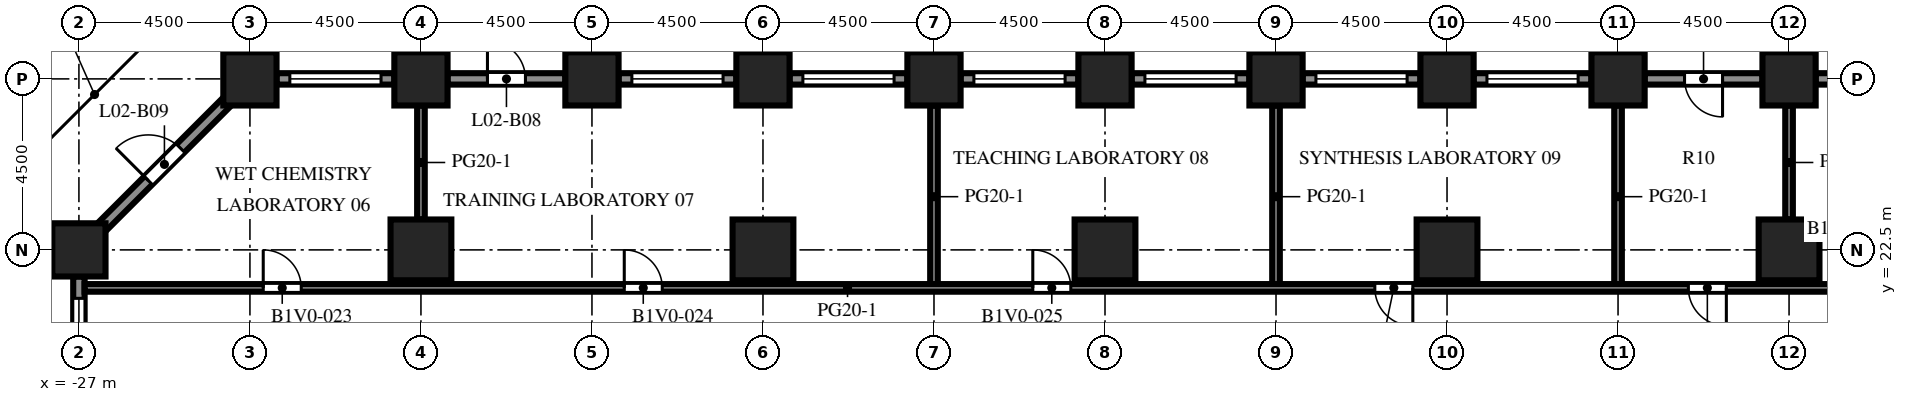
"""IFC4 building model, lengths in metres.
Left out: names, types, materials, properties, quantities, classifications, styles, units other than length and angle.
Written with IfcOpenShell. Run it as: python <this file> out.ifc"""

import sys

from ifc_helpers import new_model, si_unit, direction, frame, frame_2d, origin, origin_2d, place, context, subcontext, project, spatial, rectangle, extrude, element, fill, save


model = new_model("IFC4")
c1 = context("Model", 3, precision=1e-05, world=origin(), true_north=direction((0.0, 1.0)))
c2 = subcontext(c1, "Body", "Model", "MODEL_VIEW")
j1 = project(units=[si_unit("LENGTHUNIT", "METRE"), si_unit("PLANEANGLEUNIT", "RADIAN")], contexts=[c1])
p1 = place(None, origin())
s1 = spatial("IfcSite", under=j1, at=p1, CompositionType="ELEMENT")
p2 = place(p1, origin())
s2 = spatial("IfcBuilding", under=s1, at=p2, CompositionType="ELEMENT")
p3 = place(p2, frame((0.0, 0.0, 11.3)))
s3 = spatial("IfcBuildingStorey", under=s2, at=p3, CompositionType="ELEMENT", Elevation=11.3)
for number, where, z_axis, x_axis in (
    (1, (-27.0, 22.5, 0.0), (0.0, 0.0, 1.0), (1.0, 0.0, 0.0)),
    (2, (-22.5, 27.0, 0.0), (0.0, 0.0, 1.0), (1.0, 0.0, 0.0)),
    (3, (-18.0, 27.0, 0.0), (0.0, 0.0, 1.0), (1.0, 0.0, 0.0)),
    (4, (-13.5, 27.0, 0.0), (0.0, 0.0, 1.0), (1.0, 0.0, 0.0)),
    (5, (-9.0, 27.0, 0.0), (0.0, 0.0, 1.0), (1.0, 0.0, 0.0)),
    (6, (-4.5, 27.0, 0.0), (0.0, 0.0, 1.0), (1.0, 0.0, 0.0)),
    (7, (0.0, 27.0, 0.0), (0.0, 0.0, 1.0), (1.0, 0.0, 0.0)),
    (8, (4.5, 27.0, 0.0), (0.0, 0.0, 1.0), (1.0, 0.0, 0.0)),
    (9, (9.0, 27.0, 0.0), (0.0, 0.0, 1.0), (1.0, 0.0, 0.0)),
    (10, (13.5, 27.0, 0.0), (0.0, 0.0, 1.0), (1.0, 0.0, 0.0)),
    (11, (18.0, 27.0, 0.0), (0.0, 0.0, 1.0), (1.0, 0.0, 0.0)),
):
    element("IfcColumn", number, at=place(p3, frame(where, z_axis=z_axis, x_axis=x_axis)), inside=s3, PredefinedType="COLUMN", context=c2, shape_type="SweptSolid", body=[
        extrude(rectangle(XDim=1.4, YDim=1.4, at=origin_2d()), origin(), (0.0, 0.0, 1.0), 4.1),
    ])
for number, where, z_axis, x_axis in (
    (12, (-18.0, 22.5, 0.0), (0.0, 0.0, 1.0), (1.0, 0.0, 0.0)),
    (13, (-9.0, 22.5, 0.0), (0.0, 0.0, 1.0), (1.0, 0.0, 0.0)),
    (14, (0.0, 22.5, 0.0), (0.0, 0.0, 1.0), (1.0, 0.0, 0.0)),
    (15, (9.0, 22.5, 0.0), (0.0, 0.0, 1.0), (1.0, 0.0, 0.0)),
    (16, (18.0, 22.5, 0.0), (0.0, 0.0, 1.0), (1.0, 0.0, 0.0)),
):
    element("IfcColumn", number, at=place(p3, frame(where, z_axis=z_axis, x_axis=x_axis)), inside=s3, PredefinedType="COLUMN", context=c2, shape_type="SweptSolid", body=[
        extrude(rectangle(XDim=1.6, YDim=1.6, at=origin_2d()), origin(), (0.0, 0.0, 1.0), 4.1),
    ])
p4 = place(p3, frame((18.7, 27.0, 0.0), z_axis=(0.0, 0.0, 1.0), x_axis=(1.0, 0.0, 0.0)))
e17 = element("IfcWall", 17, at=p4, inside=s3, PredefinedType="SOLIDWALL", context=c2, shape_type="SweptSolid", body=[
    extrude(rectangle(XDim=3.1, YDim=0.3, at=frame_2d((1.55, 0.0))), origin(), (0.0, 0.0, 1.0), 2.75),
])
p5 = place(p4, frame((0.35, 0.0, 0.8)))
e18 = element("IfcOpeningElement", 18, at=p5, cuts=e17, PredefinedType="OPENING", context=c2, shape_type="SweptSolid", body=[
    extrude(rectangle(XDim=2.4, YDim=1.7, at=frame_2d((1.2, 0.85))), frame((0.0, 0.16, 0.0), z_axis=(0.0, -1.0, 0.0), x_axis=(1.0, 0.0, 0.0)), (0.0, 0.0, 1.0), 0.32),
])
p6 = place(p3, frame((14.2, 27.0, 0.0), z_axis=(0.0, 0.0, 1.0), x_axis=(1.0, 0.0, 0.0)))
e19 = element("IfcWall", 19, at=p6, inside=s3, PredefinedType="SOLIDWALL", context=c2, shape_type="SweptSolid", body=[
    extrude(rectangle(XDim=3.1, YDim=0.3, at=frame_2d((1.55, 0.0))), origin(), (0.0, 0.0, 1.0), 2.75),
])
p7 = place(p6, frame((1.05, 0.0, 0.0)))
e20 = element("IfcOpeningElement", 20, at=p7, cuts=e19, PredefinedType="OPENING", context=c2, shape_type="SweptSolid", body=[
    extrude(rectangle(XDim=1.0, YDim=2.2, at=frame_2d((0.5, 1.1))), frame((0.0, 0.16, 0.0), z_axis=(0.0, -1.0, 0.0), x_axis=(1.0, 0.0, 0.0)), (0.0, 0.0, 1.0), 0.32),
])
p8 = place(p3, frame((9.7, 27.0, 0.0), z_axis=(0.0, 0.0, 1.0), x_axis=(1.0, 0.0, 0.0)))
e21 = element("IfcWall", 21, at=p8, inside=s3, PredefinedType="SOLIDWALL", context=c2, shape_type="SweptSolid", body=[
    extrude(rectangle(XDim=3.1, YDim=0.3, at=frame_2d((1.55, 0.0))), origin(), (0.0, 0.0, 1.0), 2.75),
])
p9 = place(p8, frame((0.35, 0.0, 0.8)))
e22 = element("IfcOpeningElement", 22, at=p9, cuts=e21, PredefinedType="OPENING", context=c2, shape_type="SweptSolid", body=[
    extrude(rectangle(XDim=2.4, YDim=1.7, at=frame_2d((1.2, 0.85))), frame((0.0, 0.16, 0.0), z_axis=(0.0, -1.0, 0.0), x_axis=(1.0, 0.0, 0.0)), (0.0, 0.0, 1.0), 0.32),
])
p10 = place(p3, frame((5.2, 27.0, 0.0), z_axis=(0.0, 0.0, 1.0), x_axis=(1.0, 0.0, 0.0)))
e23 = element("IfcWall", 23, at=p10, inside=s3, PredefinedType="SOLIDWALL", context=c2, shape_type="SweptSolid", body=[
    extrude(rectangle(XDim=3.1, YDim=0.3, at=frame_2d((1.55, 0.0))), origin(), (0.0, 0.0, 1.0), 2.75),
])
p11 = place(p10, frame((0.35, 0.0, 0.8)))
e24 = element("IfcOpeningElement", 24, at=p11, cuts=e23, PredefinedType="OPENING", context=c2, shape_type="SweptSolid", body=[
    extrude(rectangle(XDim=2.4, YDim=1.7, at=frame_2d((1.2, 0.85))), frame((0.0, 0.16, 0.0), z_axis=(0.0, -1.0, 0.0), x_axis=(1.0, 0.0, 0.0)), (0.0, 0.0, 1.0), 0.32),
])
p12 = place(p3, frame((0.7, 27.0, 0.0), z_axis=(0.0, 0.0, 1.0), x_axis=(1.0, 0.0, 0.0)))
e25 = element("IfcWall", 25, at=p12, inside=s3, PredefinedType="SOLIDWALL", context=c2, shape_type="SweptSolid", body=[
    extrude(rectangle(XDim=3.1, YDim=0.3, at=frame_2d((1.55, 0.0))), origin(), (0.0, 0.0, 1.0), 2.75),
])
p13 = place(p12, frame((0.35, 0.0, 0.8)))
e26 = element("IfcOpeningElement", 26, at=p13, cuts=e25, PredefinedType="OPENING", context=c2, shape_type="SweptSolid", body=[
    extrude(rectangle(XDim=2.4, YDim=1.7, at=frame_2d((1.2, 0.85))), frame((0.0, 0.16, 0.0), z_axis=(0.0, -1.0, 0.0), x_axis=(1.0, 0.0, 0.0)), (0.0, 0.0, 1.0), 0.32),
])
p14 = place(p3, frame((-3.8, 27.0, 0.0), z_axis=(0.0, 0.0, 1.0), x_axis=(1.0, 0.0, 0.0)))
e27 = element("IfcWall", 27, at=p14, inside=s3, PredefinedType="SOLIDWALL", context=c2, shape_type="SweptSolid", body=[
    extrude(rectangle(XDim=3.1, YDim=0.3, at=frame_2d((1.55, 0.0))), origin(), (0.0, 0.0, 1.0), 2.75),
])
p15 = place(p14, frame((0.35, 0.0, 0.8)))
e28 = element("IfcOpeningElement", 28, at=p15, cuts=e27, PredefinedType="OPENING", context=c2, shape_type="SweptSolid", body=[
    extrude(rectangle(XDim=2.4, YDim=1.7, at=frame_2d((1.2, 0.85))), frame((0.0, 0.16, 0.0), z_axis=(0.0, -1.0, 0.0), x_axis=(1.0, 0.0, 0.0)), (0.0, 0.0, 1.0), 0.32),
])
p16 = place(p3, frame((-8.3, 27.0, 0.0), z_axis=(0.0, 0.0, 1.0), x_axis=(1.0, 0.0, 0.0)))
e29 = element("IfcWall", 29, at=p16, inside=s3, PredefinedType="SOLIDWALL", context=c2, shape_type="SweptSolid", body=[
    extrude(rectangle(XDim=3.1, YDim=0.3, at=frame_2d((1.55, 0.0))), origin(), (0.0, 0.0, 1.0), 2.75),
])
p17 = place(p16, frame((0.35, 0.0, 0.8)))
e30 = element("IfcOpeningElement", 30, at=p17, cuts=e29, PredefinedType="OPENING", context=c2, shape_type="SweptSolid", body=[
    extrude(rectangle(XDim=2.4, YDim=1.7, at=frame_2d((1.2, 0.85))), frame((0.0, 0.16, 0.0), z_axis=(0.0, -1.0, 0.0), x_axis=(1.0, 0.0, 0.0)), (0.0, 0.0, 1.0), 0.32),
])
p18 = place(p3, frame((-12.8, 27.0, 0.0), z_axis=(0.0, 0.0, 1.0), x_axis=(1.0, 0.0, 0.0)))
e31 = element("IfcWall", 31, at=p18, inside=s3, PredefinedType="SOLIDWALL", context=c2, shape_type="SweptSolid", body=[
    extrude(rectangle(XDim=3.1, YDim=0.3, at=frame_2d((1.55, 0.0))), origin(), (0.0, 0.0, 1.0), 2.75),
])
p19 = place(p18, frame((0.35, 0.0, 0.8)))
e32 = element("IfcOpeningElement", 32, at=p19, cuts=e31, PredefinedType="OPENING", context=c2, shape_type="SweptSolid", body=[
    extrude(rectangle(XDim=2.4, YDim=1.7, at=frame_2d((1.2, 0.85))), frame((0.0, 0.16, 0.0), z_axis=(0.0, -1.0, 0.0), x_axis=(1.0, 0.0, 0.0)), (0.0, 0.0, 1.0), 0.32),
])
p20 = place(p3, frame((-17.3, 27.0, 0.0), z_axis=(0.0, 0.0, 1.0), x_axis=(1.0, 0.0, 0.0)))
e33 = element("IfcWall", 33, at=p20, inside=s3, PredefinedType="SOLIDWALL", context=c2, shape_type="SweptSolid", body=[
    extrude(rectangle(XDim=3.1, YDim=0.3, at=frame_2d((1.55, 0.0))), origin(), (0.0, 0.0, 1.0), 2.75),
])
p21 = place(p20, frame((1.05, 0.0, 0.0)))
e34 = element("IfcOpeningElement", 34, at=p21, cuts=e33, PredefinedType="OPENING", context=c2, shape_type="SweptSolid", body=[
    extrude(rectangle(XDim=1.0, YDim=2.2, at=frame_2d((0.5, 1.1))), frame((0.0, 0.16, 0.0), z_axis=(0.0, -1.0, 0.0), x_axis=(1.0, 0.0, 0.0)), (0.0, 0.0, 1.0), 0.32),
])
p22 = place(p3, frame((-21.8, 27.0, 0.0), z_axis=(0.0, 0.0, 1.0), x_axis=(1.0, 0.0, 0.0)))
e35 = element("IfcWall", 35, at=p22, inside=s3, PredefinedType="SOLIDWALL", context=c2, shape_type="SweptSolid", body=[
    extrude(rectangle(XDim=3.1, YDim=0.3, at=frame_2d((1.55, 0.0))), origin(), (0.0, 0.0, 1.0), 2.75),
])
p23 = place(p22, frame((0.35, 0.0, 0.8)))
e36 = element("IfcOpeningElement", 36, at=p23, cuts=e35, PredefinedType="OPENING", context=c2, shape_type="SweptSolid", body=[
    extrude(rectangle(XDim=2.4, YDim=1.7, at=frame_2d((1.2, 0.85))), frame((0.0, 0.16, 0.0), z_axis=(0.0, -1.0, 0.0), x_axis=(1.0, 0.0, 0.0)), (0.0, 0.0, 1.0), 0.32),
])
p24 = place(p3, frame((-26.406, 23.094, 0.0), z_axis=(0.0, 0.0, 1.0), x_axis=(0.707106781187, 0.707106781187, 0.0)))
e37 = element("IfcWall", 37, at=p24, inside=s3, PredefinedType="SOLIDWALL", context=c2, shape_type="SweptSolid", body=[
    extrude(rectangle(XDim=4.684, YDim=0.3, at=frame_2d((2.342, 0.0))), origin(), (0.0, 0.0, 1.0), 2.75),
])
p25 = place(p24, frame((1.742, 0.0, 0.0)))
e38 = element("IfcOpeningElement", 38, at=p25, cuts=e37, PredefinedType="OPENING", context=c2, shape_type="SweptSolid", body=[
    extrude(rectangle(XDim=1.2, YDim=2.2, at=frame_2d((0.6, 1.1))), frame((0.0, 0.16, 0.0), z_axis=(0.0, -1.0, 0.0), x_axis=(1.0, 0.0, 0.0)), (0.0, 0.0, 1.0), 0.32),
])
p26 = place(p3, frame((-27.0, 18.7, 0.0), z_axis=(0.0, 0.0, 1.0), x_axis=(0.0, 1.0, 0.0)))
e39 = element("IfcWall", 39, at=p26, inside=s3, PredefinedType="SOLIDWALL", context=c2, shape_type="SweptSolid", body=[
    extrude(rectangle(XDim=3.1, YDim=0.3, at=frame_2d((1.55, 0.0))), origin(), (0.0, 0.0, 1.0), 2.75),
])
p27 = place(p26, frame((0.125, 0.0, 0.8)))
e40 = element("IfcOpeningElement", 40, at=p27, cuts=e39, PredefinedType="OPENING", context=c2, shape_type="SweptSolid", body=[
    extrude(rectangle(XDim=2.4, YDim=1.7, at=frame_2d((1.2, 0.85))), frame((0.0, 0.16, 0.0), z_axis=(0.0, -1.0, 0.0), x_axis=(1.0, 0.0, 0.0)), (0.0, 0.0, 1.0), 0.32),
])
p28 = place(p3, frame((-18.0, 23.3, 0.0), z_axis=(0.0, 0.0, 1.0), x_axis=(0.0, 1.0, 0.0)))
e41 = element("IfcWall", 41, at=p28, inside=s3, PredefinedType="PARTITIONING", context=c2, shape_type="SweptSolid", body=[
    extrude(rectangle(XDim=3.0, YDim=0.2, at=frame_2d((1.5, 0.0))), origin(), (0.0, 0.0, 1.0), 3.65),
])
for number, where, z_axis, x_axis in (
    (42, (-4.5, 21.5, 0.0), (0.0, 0.0, 1.0), (0.0, 1.0, 0.0)),
    (43, (4.5, 21.5, 0.0), (0.0, 0.0, 1.0), (0.0, 1.0, 0.0)),
    (44, (13.5, 21.5, 0.0), (0.0, 0.0, 1.0), (0.0, 1.0, 0.0)),
):
    element("IfcWall", number, at=place(p3, frame(where, z_axis=z_axis, x_axis=x_axis)), inside=s3, PredefinedType="PARTITIONING", context=c2, shape_type="SweptSolid", body=[
        extrude(rectangle(XDim=4.8, YDim=0.2, at=frame_2d((2.4, 0.0))), origin(), (0.0, 0.0, 1.0), 3.65),
    ])
p29 = place(p3, frame((18.0, 23.3, 0.0), z_axis=(0.0, 0.0, 1.0), x_axis=(0.0, 1.0, 0.0)))
e45 = element("IfcWall", 45, at=p29, inside=s3, PredefinedType="PARTITIONING", context=c2, shape_type="SweptSolid", body=[
    extrude(rectangle(XDim=3.0, YDim=0.2, at=frame_2d((1.5, 0.0))), origin(), (0.0, 0.0, 1.0), 3.65),
])
p30 = place(p3, frame((-26.85, 21.5, 0.0), z_axis=(0.0, 0.0, 1.0), x_axis=(1.0, 0.0, 0.0)))
e46 = element("IfcWall", 46, at=p30, inside=s3, PredefinedType="PARTITIONING", context=c2, shape_type="SweptSolid", body=[
    extrude(rectangle(XDim=53.7, YDim=0.2, at=frame_2d((26.85, 0.0))), origin(), (0.0, 0.0, 1.0), 3.65),
])
p31 = place(p30, frame((4.7, 0.0, 0.0)))
e47 = element("IfcOpeningElement", 47, at=p31, cuts=e46, PredefinedType="OPENING", context=c2, shape_type="SweptSolid", body=[
    extrude(rectangle(XDim=1.0, YDim=2.1, at=frame_2d((0.5, 1.05))), frame((0.0, 0.11, 0.0), z_axis=(0.0, -1.0, 0.0), x_axis=(1.0, 0.0, 0.0)), (0.0, 0.0, 1.0), 0.22),
])
p32 = place(p30, frame((14.2, 0.0, 0.0)))
e48 = element("IfcOpeningElement", 48, at=p32, cuts=e46, PredefinedType="OPENING", context=c2, shape_type="SweptSolid", body=[
    extrude(rectangle(XDim=1.0, YDim=2.1, at=frame_2d((0.5, 1.05))), frame((0.0, 0.11, 0.0), z_axis=(0.0, -1.0, 0.0), x_axis=(1.0, 0.0, 0.0)), (0.0, 0.0, 1.0), 0.22),
])
p33 = place(p30, frame((24.95, 0.0, 0.0)))
e49 = element("IfcOpeningElement", 49, at=p33, cuts=e46, PredefinedType="OPENING", context=c2, shape_type="SweptSolid", body=[
    extrude(rectangle(XDim=1.0, YDim=2.1, at=frame_2d((0.5, 1.05))), frame((0.0, 0.11, 0.0), z_axis=(0.0, -1.0, 0.0), x_axis=(1.0, 0.0, 0.0)), (0.0, 0.0, 1.0), 0.22),
])
p34 = place(p30, frame((33.95, 0.0, 0.0)))
e50 = element("IfcOpeningElement", 50, at=p34, cuts=e46, PredefinedType="OPENING", context=c2, shape_type="SweptSolid", body=[
    extrude(rectangle(XDim=1.0, YDim=2.1, at=frame_2d((0.5, 1.05))), frame((0.0, 0.11, 0.0), z_axis=(0.0, -1.0, 0.0), x_axis=(1.0, 0.0, 0.0)), (0.0, 0.0, 1.0), 0.22),
])
p35 = place(p30, frame((42.2, 0.0, 0.0)))
e51 = element("IfcOpeningElement", 51, at=p35, cuts=e46, PredefinedType="OPENING", context=c2, shape_type="SweptSolid", body=[
    extrude(rectangle(XDim=1.0, YDim=2.1, at=frame_2d((0.5, 1.05))), frame((0.0, 0.11, 0.0), z_axis=(0.0, -1.0, 0.0), x_axis=(1.0, 0.0, 0.0)), (0.0, 0.0, 1.0), 0.22),
])
p36 = place(p30, frame((47.45, 0.0, 0.0)))
e52 = element("IfcOpeningElement", 52, at=p36, cuts=e46, PredefinedType="OPENING", context=c2, shape_type="SweptSolid", body=[
    extrude(rectangle(XDim=1.0, YDim=2.1, at=frame_2d((0.5, 1.05))), frame((0.0, 0.11, 0.0), z_axis=(0.0, -1.0, 0.0), x_axis=(1.0, 0.0, 0.0)), (0.0, 0.0, 1.0), 0.22),
])
p37 = place(p7, origin())
e53 = element("IfcDoor", 53, at=p37, inside=s3, OperationType="SINGLE_SWING_RIGHT", PredefinedType="DOOR", context=c2, shape_type="SweptSolid", body=[
    extrude(rectangle(XDim=1.0, YDim=2.2, at=frame_2d((0.5, 1.1))), frame((0.0, 0.025, 0.0), z_axis=(0.0, -1.0, 0.0), x_axis=(1.0, 0.0, 0.0)), (0.0, 0.0, 1.0), 0.05),
])
fill(e20, e53)
p38 = place(p9, origin())
e54 = element("IfcWindow", 54, at=p38, inside=s3, PartitioningType="SINGLE_PANEL", PredefinedType="WINDOW", context=c2, shape_type="SweptSolid", body=[
    extrude(rectangle(XDim=2.4, YDim=1.7, at=frame_2d((1.2, 0.85))), frame((0.0, 0.03, 0.0), z_axis=(0.0, -1.0, 0.0), x_axis=(1.0, 0.0, 0.0)), (0.0, 0.0, 1.0), 0.06),
])
fill(e22, e54)
p39 = place(p11, origin())
e55 = element("IfcWindow", 55, at=p39, inside=s3, PartitioningType="SINGLE_PANEL", PredefinedType="WINDOW", context=c2, shape_type="SweptSolid", body=[
    extrude(rectangle(XDim=2.4, YDim=1.7, at=frame_2d((1.2, 0.85))), frame((0.0, 0.03, 0.0), z_axis=(0.0, -1.0, 0.0), x_axis=(1.0, 0.0, 0.0)), (0.0, 0.0, 1.0), 0.06),
])
fill(e24, e55)
p40 = place(p13, origin())
e56 = element("IfcWindow", 56, at=p40, inside=s3, PartitioningType="SINGLE_PANEL", PredefinedType="WINDOW", context=c2, shape_type="SweptSolid", body=[
    extrude(rectangle(XDim=2.4, YDim=1.7, at=frame_2d((1.2, 0.85))), frame((0.0, 0.03, 0.0), z_axis=(0.0, -1.0, 0.0), x_axis=(1.0, 0.0, 0.0)), (0.0, 0.0, 1.0), 0.06),
])
fill(e26, e56)
p41 = place(p15, origin())
e57 = element("IfcWindow", 57, at=p41, inside=s3, PartitioningType="SINGLE_PANEL", PredefinedType="WINDOW", context=c2, shape_type="SweptSolid", body=[
    extrude(rectangle(XDim=2.4, YDim=1.7, at=frame_2d((1.2, 0.85))), frame((0.0, 0.03, 0.0), z_axis=(0.0, -1.0, 0.0), x_axis=(1.0, 0.0, 0.0)), (0.0, 0.0, 1.0), 0.06),
])
fill(e28, e57)
p42 = place(p17, origin())
e58 = element("IfcWindow", 58, at=p42, inside=s3, PartitioningType="SINGLE_PANEL", PredefinedType="WINDOW", context=c2, shape_type="SweptSolid", body=[
    extrude(rectangle(XDim=2.4, YDim=1.7, at=frame_2d((1.2, 0.85))), frame((0.0, 0.03, 0.0), z_axis=(0.0, -1.0, 0.0), x_axis=(1.0, 0.0, 0.0)), (0.0, 0.0, 1.0), 0.06),
])
fill(e30, e58)
p43 = place(p19, origin())
e59 = element("IfcWindow", 59, at=p43, inside=s3, PartitioningType="SINGLE_PANEL", PredefinedType="WINDOW", context=c2, shape_type="SweptSolid", body=[
    extrude(rectangle(XDim=2.4, YDim=1.7, at=frame_2d((1.2, 0.85))), frame((0.0, 0.03, 0.0), z_axis=(0.0, -1.0, 0.0), x_axis=(1.0, 0.0, 0.0)), (0.0, 0.0, 1.0), 0.06),
])
fill(e32, e59)
p44 = place(p21, origin())
e60 = element("IfcDoor", 60, at=p44, inside=s3, OperationType="SINGLE_SWING_LEFT", PredefinedType="DOOR", context=c2, shape_type="SweptSolid", body=[
    extrude(rectangle(XDim=1.0, YDim=2.2, at=frame_2d((0.5, 1.1))), frame((0.0, 0.025, 0.0), z_axis=(0.0, -1.0, 0.0), x_axis=(1.0, 0.0, 0.0)), (0.0, 0.0, 1.0), 0.05),
])
fill(e34, e60)
p45 = place(p23, origin())
e61 = element("IfcWindow", 61, at=p45, inside=s3, PartitioningType="SINGLE_PANEL", PredefinedType="WINDOW", context=c2, shape_type="SweptSolid", body=[
    extrude(rectangle(XDim=2.4, YDim=1.7, at=frame_2d((1.2, 0.85))), frame((0.0, 0.03, 0.0), z_axis=(0.0, -1.0, 0.0), x_axis=(1.0, 0.0, 0.0)), (0.0, 0.0, 1.0), 0.06),
])
fill(e36, e61)
p46 = place(p25, origin())
e62 = element("IfcDoor", 62, at=p46, inside=s3, OperationType="SINGLE_SWING_LEFT", PredefinedType="DOOR", context=c2, shape_type="SweptSolid", body=[
    extrude(rectangle(XDim=1.2, YDim=2.2, at=frame_2d((0.6, 1.1))), frame((0.0, 0.025, 0.0), z_axis=(0.0, -1.0, 0.0), x_axis=(1.0, 0.0, 0.0)), (0.0, 0.0, 1.0), 0.05),
])
fill(e38, e62)
p47 = place(p27, origin())
e63 = element("IfcWindow", 63, at=p47, inside=s3, PartitioningType="SINGLE_PANEL", PredefinedType="WINDOW", context=c2, shape_type="SweptSolid", body=[
    extrude(rectangle(XDim=2.4, YDim=1.7, at=frame_2d((1.2, 0.85))), frame((0.0, 0.03, 0.0), z_axis=(0.0, -1.0, 0.0), x_axis=(1.0, 0.0, 0.0)), (0.0, 0.0, 1.0), 0.06),
])
fill(e40, e63)
p48 = place(p31, origin())
e64 = element("IfcDoor", 64, at=p48, inside=s3, OperationType="SINGLE_SWING_LEFT", PredefinedType="DOOR", context=c2, shape_type="SweptSolid", body=[
    extrude(rectangle(XDim=1.0, YDim=2.1, at=frame_2d((0.5, 1.05))), frame((0.0, 0.025, 0.0), z_axis=(0.0, -1.0, 0.0), x_axis=(1.0, 0.0, 0.0)), (0.0, 0.0, 1.0), 0.05),
])
fill(e47, e64)
p49 = place(p32, origin())
e65 = element("IfcDoor", 65, at=p49, inside=s3, OperationType="SINGLE_SWING_LEFT", PredefinedType="DOOR", context=c2, shape_type="SweptSolid", body=[
    extrude(rectangle(XDim=1.0, YDim=2.1, at=frame_2d((0.5, 1.05))), frame((0.0, 0.025, 0.0), z_axis=(0.0, -1.0, 0.0), x_axis=(1.0, 0.0, 0.0)), (0.0, 0.0, 1.0), 0.05),
])
fill(e48, e65)
p50 = place(p33, origin())
e66 = element("IfcDoor", 66, at=p50, inside=s3, OperationType="SINGLE_SWING_LEFT", PredefinedType="DOOR", context=c2, shape_type="SweptSolid", body=[
    extrude(rectangle(XDim=1.0, YDim=2.1, at=frame_2d((0.5, 1.05))), frame((0.0, 0.025, 0.0), z_axis=(0.0, -1.0, 0.0), x_axis=(1.0, 0.0, 0.0)), (0.0, 0.0, 1.0), 0.05),
])
fill(e49, e66)
p51 = place(p34, origin())
e67 = element("IfcDoor", 67, at=p51, inside=s3, OperationType="SINGLE_SWING_RIGHT", PredefinedType="DOOR", context=c2, shape_type="SweptSolid", body=[
    extrude(rectangle(XDim=1.0, YDim=2.1, at=frame_2d((0.5, 1.05))), frame((0.0, 0.025, 0.0), z_axis=(0.0, -1.0, 0.0), x_axis=(1.0, 0.0, 0.0)), (0.0, 0.0, 1.0), 0.05),
])
fill(e50, e67)
p52 = place(p35, origin())
e68 = element("IfcDoor", 68, at=p52, inside=s3, OperationType="SINGLE_SWING_RIGHT", PredefinedType="DOOR", context=c2, shape_type="SweptSolid", body=[
    extrude(rectangle(XDim=1.0, YDim=2.1, at=frame_2d((0.5, 1.05))), frame((0.0, 0.025, 0.0), z_axis=(0.0, -1.0, 0.0), x_axis=(1.0, 0.0, 0.0)), (0.0, 0.0, 1.0), 0.05),
])
fill(e51, e68)
save(model, sys.argv[1])
